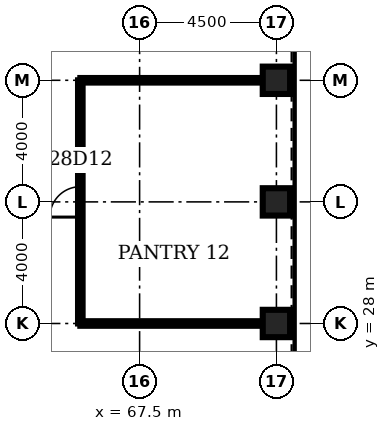
"""IFC4 building model, lengths in metres.
Left out: names, types, materials, properties, quantities, classifications, styles, units other than length and angle.
Written with IfcOpenShell. Run it as: python <this file> out.ifc"""

import sys

from ifc_helpers import new_model, si_unit, direction, frame, frame_2d, origin, origin_2d, place, context, subcontext, project, spatial, rectangle, hollow_rectangle, extrude, element, fill, save


model = new_model("IFC4")
c1 = context("Model", 3, precision=1e-05, world=origin(), true_north=direction((0.0, 1.0)))
c2 = subcontext(c1, "Body", "Model", "MODEL_VIEW")
j1 = project(units=[si_unit("LENGTHUNIT", "METRE"), si_unit("PLANEANGLEUNIT", "RADIAN")], contexts=[c1])
p1 = place(None, origin())
s1 = spatial("IfcSite", under=j1, at=p1, CompositionType="ELEMENT")
p2 = place(p1, origin())
s2 = spatial("IfcBuilding", under=s1, at=p2, CompositionType="ELEMENT")
p3 = place(p2, frame((0.0, 0.0, 129.9)))
s3 = spatial("IfcBuildingStorey", under=s2, at=p3, CompositionType="ELEMENT", Elevation=129.9)
for number, where, z_axis, x_axis in (
    (1, (72.0, 28.0, 0.0), (0.0, 0.0, 1.0), (1.0, 0.0, 0.0)),
    (2, (72.0, 32.0, 0.0), (0.0, 0.0, 1.0), (1.0, 0.0, 0.0)),
    (3, (72.0, 36.0, 0.0), (0.0, 0.0, 1.0), (1.0, 0.0, 0.0)),
):
    element("IfcColumn", number, at=place(p3, frame(where, z_axis=z_axis, x_axis=x_axis)), inside=s3, PredefinedType="COLUMN", context=c2, shape_type="SweptSolid", body=[
        extrude(hollow_rectangle(XDim=0.9, YDim=0.9, WallThickness=0.1, at=origin_2d()), origin(), (0.0, 0.0, 1.0), 4.2),
    ])
for number, where, z_axis, x_axis in (
    (4, (65.55, 28.0, 0.0), (0.0, 0.0, 1.0), (1.0, 0.0, 0.0)),
    (5, (65.55, 36.0, 0.0), (0.0, 0.0, 1.0), (1.0, 0.0, 0.0)),
):
    element("IfcWall", number, at=place(p3, frame(where, z_axis=z_axis, x_axis=x_axis)), inside=s3, PredefinedType="PARTITIONING", context=c2, shape_type="SweptSolid", body=[
        extrude(rectangle(XDim=6.0, YDim=0.15, at=frame_2d((3.0, 0.0))), origin(), (0.0, 0.0, 1.0), 3.0),
    ])
p4 = place(p3, frame((65.55, 28.0, 0.0), z_axis=(0.0, 0.0, 1.0), x_axis=(0.0, 1.0, 0.0)))
e6 = element("IfcWall", 6, at=p4, inside=s3, PredefinedType="PARTITIONING", context=c2, shape_type="SweptSolid", body=[
    extrude(rectangle(XDim=8.0, YDim=0.15, at=frame_2d((4.0, 0.0))), origin(), (0.0, 0.0, 1.0), 3.0),
])
p5 = place(p4, frame((3.5, 0.0, 0.0)))
e7 = element("IfcOpeningElement", 7, at=p5, cuts=e6, PredefinedType="OPENING", context=c2, shape_type="SweptSolid", body=[
    extrude(rectangle(XDim=1.0, YDim=2.1, at=frame_2d((0.5, 1.05))), frame((0.0, 0.085, 0.0), z_axis=(0.0, -1.0, 0.0), x_axis=(1.0, 0.0, 0.0)), (0.0, 0.0, 1.0), 0.17),
])
p6 = place(p5, origin())
e8 = element("IfcDoor", 8, at=p6, inside=s3, OperationType="SINGLE_SWING_LEFT", PredefinedType="DOOR", context=c2, shape_type="SweptSolid", body=[
    extrude(rectangle(XDim=1.0, YDim=2.1, at=frame_2d((0.5, 1.05))), frame((0.0, 0.025, 0.0), z_axis=(0.0, -1.0, 0.0), x_axis=(1.0, 0.0, 0.0)), (0.0, 0.0, 1.0), 0.05),
])
fill(e7, e8)
save(model, sys.argv[1])
